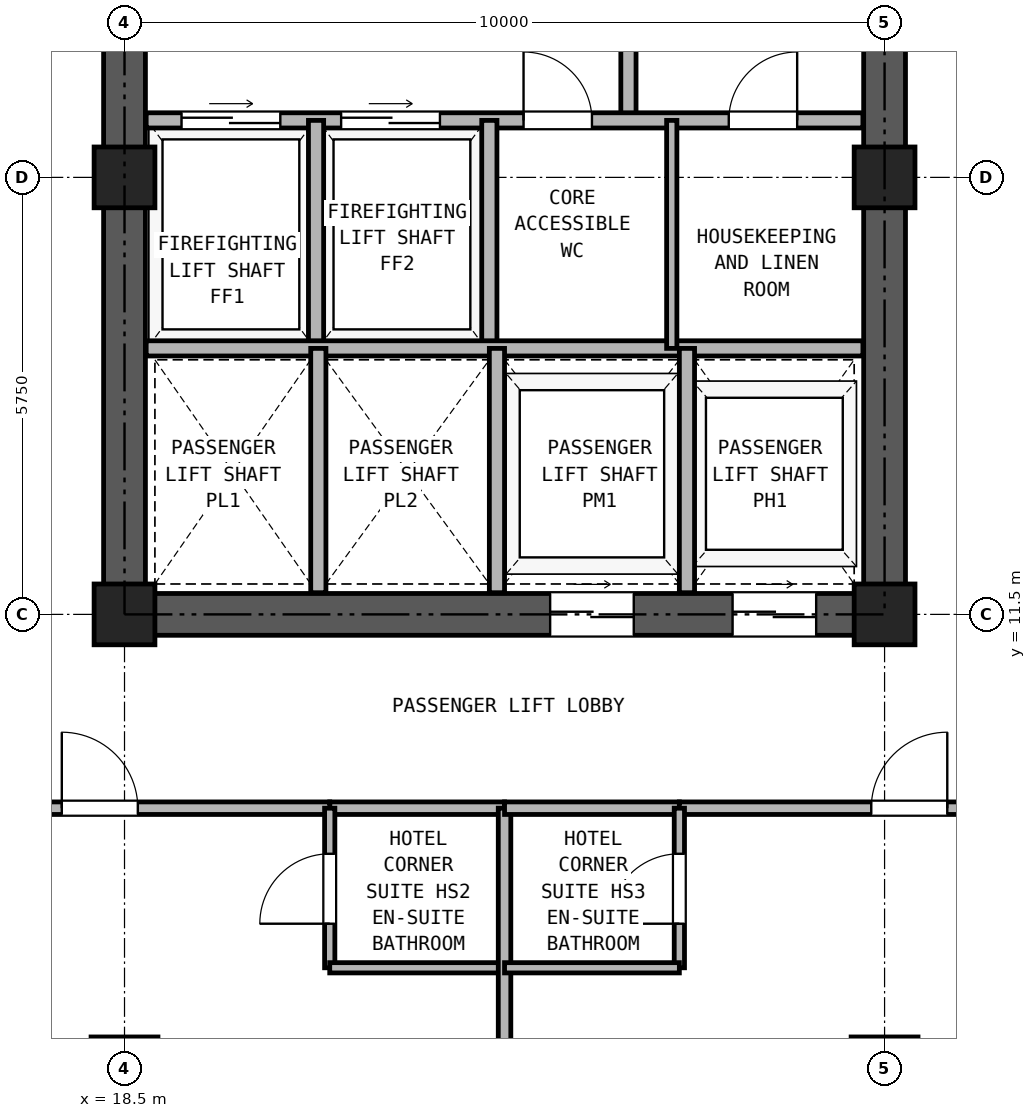
"""IFC4 building model, lengths in metres.
Left out: names, types, materials, properties, quantities, classifications, styles, units other than length and angle.
Written with IfcOpenShell. Run it as: python <this file> out.ifc"""

import sys

from ifc_helpers import new_model, si_unit, direction, frame, frame_2d, origin, origin_2d, place, context, subcontext, project, spatial, rectangle, hollow_rectangle, extrude, source, transform, mapped, element, fill, save


model = new_model("IFC4")
c1 = context("Model", 3, precision=1e-05, world=origin(), true_north=direction((0.0, 1.0)))
c2 = subcontext(c1, "Body", "Model", "MODEL_VIEW")
j1 = project(units=[si_unit("LENGTHUNIT", "METRE"), si_unit("PLANEANGLEUNIT", "RADIAN")], contexts=[c1])
p1 = place(None, origin())
s1 = spatial("IfcSite", under=j1, at=p1, CompositionType="ELEMENT")
p2 = place(p1, origin())
s2 = spatial("IfcBuilding", under=s1, at=p2, CompositionType="ELEMENT")
p3 = place(p2, frame((0.0, 0.0, 92.7)))
s3 = spatial("IfcBuildingStorey", under=s2, at=p3, CompositionType="ELEMENT", Elevation=92.7)
m1 = source(origin(), c2, "Body", "SweptSolid", [
    extrude(hollow_rectangle(XDim=0.88, YDim=0.88, WallThickness=0.05, at=origin_2d()), origin(), (0.0, 0.0, 1.0), 2.95),
])
p4 = place(p3, frame((18.5, 5.5, 0.0), z_axis=(0.0, 0.0, 1.0), x_axis=(1.0, 0.0, 0.0)))
e1 = element("IfcColumn", 1, at=p4, inside=s3, PredefinedType="COLUMN", context=c2, shape_type="MappedRepresentation", body=[
    mapped(m1, transform((0.0, 0.0, 0.0), x_axis=(1.0, 0.0, 0.0), y_axis=(0.0, 1.0, 0.0), z_axis=(0.0, 0.0, 1.0), scale=1.0)),
])
m2 = source(origin(), c2, "Body", "SweptSolid", [
    extrude(hollow_rectangle(XDim=0.8, YDim=0.8, WallThickness=0.045, at=origin_2d()), origin(), (0.0, 0.0, 1.0), 2.95),
])
for number, where, z_axis, x_axis in (
    (2, (18.5, 11.5, 0.0), (0.0, 0.0, 1.0), (1.0, 0.0, 0.0)),
    (3, (18.5, 17.25, 0.0), (0.0, 0.0, 1.0), (1.0, 0.0, 0.0)),
):
    element("IfcColumn", number, at=place(p3, frame(where, z_axis=z_axis, x_axis=x_axis)), inside=s3, PredefinedType="COLUMN", context=c2, shape_type="MappedRepresentation", body=[
        mapped(m2, transform((0.0, 0.0, 0.0), x_axis=(1.0, 0.0, 0.0), y_axis=(0.0, 1.0, 0.0), z_axis=(0.0, 0.0, 1.0), scale=1.0)),
    ])
p5 = place(p3, frame((28.5, 5.5, 0.0), z_axis=(0.0, 0.0, 1.0), x_axis=(1.0, 0.0, 0.0)))
e4 = element("IfcColumn", 4, at=p5, inside=s3, PredefinedType="COLUMN", context=c2, shape_type="MappedRepresentation", body=[
    mapped(m1, transform((0.0, 0.0, 0.0), x_axis=(1.0, 0.0, 0.0), y_axis=(0.0, 1.0, 0.0), z_axis=(0.0, 0.0, 1.0), scale=1.0)),
])
for number, where, z_axis, x_axis in (
    (5, (28.5, 11.5, 0.0), (0.0, 0.0, 1.0), (1.0, 0.0, 0.0)),
    (6, (28.5, 17.25, 0.0), (0.0, 0.0, 1.0), (1.0, 0.0, 0.0)),
):
    element("IfcColumn", number, at=place(p3, frame(where, z_axis=z_axis, x_axis=x_axis)), inside=s3, PredefinedType="COLUMN", context=c2, shape_type="MappedRepresentation", body=[
        mapped(m2, transform((0.0, 0.0, 0.0), x_axis=(1.0, 0.0, 0.0), y_axis=(0.0, 1.0, 0.0), z_axis=(0.0, 0.0, 1.0), scale=1.0)),
    ])
p6 = place(p3, frame((18.225, 11.5, 0.0), z_axis=(0.0, 0.0, 1.0), x_axis=(1.0, 0.0, 0.0)))
e7 = element("IfcWall", 7, at=p6, inside=s3, PredefinedType="SHEAR", context=c2, shape_type="SweptSolid", body=[
    extrude(rectangle(XDim=10.55, YDim=0.55, at=frame_2d((5.275, 0.0))), origin(), (0.0, 0.0, 1.0), 2.95),
])
p7 = place(p6, frame((5.875, 0.0, 0.0)))
e8 = element("IfcOpeningElement", 8, at=p7, cuts=e7, PredefinedType="OPENING", context=c2, shape_type="SweptSolid", body=[
    extrude(rectangle(XDim=1.1, YDim=2.25, at=frame_2d((0.55, 1.125))), frame((0.0, 0.285, 0.0), z_axis=(0.0, -1.0, 0.0), x_axis=(1.0, 0.0, 0.0)), (0.0, 0.0, 1.0), 0.57),
])
p8 = place(p6, frame((8.275, 0.0, 0.0)))
e9 = element("IfcOpeningElement", 9, at=p8, cuts=e7, PredefinedType="OPENING", context=c2, shape_type="SweptSolid", body=[
    extrude(rectangle(XDim=1.1, YDim=2.25, at=frame_2d((0.55, 1.125))), frame((0.0, 0.285, 0.0), z_axis=(0.0, -1.0, 0.0), x_axis=(1.0, 0.0, 0.0)), (0.0, 0.0, 1.0), 0.57),
])
p9 = place(p3, frame((18.5, 11.775, 0.0), z_axis=(0.0, 0.0, 1.0), x_axis=(0.0, 1.0, 0.0)))
e10 = element("IfcWall", 10, at=p9, inside=s3, PredefinedType="SHEAR", context=c2, shape_type="SweptSolid", body=[
    extrude(rectangle(XDim=16.7, YDim=0.55, at=frame_2d((8.35, 0.0))), origin(), (0.0, 0.0, 1.0), 2.95),
])
p10 = place(p9, frame((7.375, 0.0, 0.0)))
e11 = element("IfcOpeningElement", 11, at=p10, cuts=e10, PredefinedType="OPENING", context=c2, shape_type="SweptSolid", body=[
    extrude(rectangle(XDim=1.15, YDim=2.2, at=frame_2d((0.575, 1.1))), frame((0.0, 0.285, 0.0), z_axis=(0.0, -1.0, 0.0), x_axis=(1.0, 0.0, 0.0)), (0.0, 0.0, 1.0), 0.57),
])
p11 = place(p3, frame((28.5, 11.775, 0.0), z_axis=(0.0, 0.0, 1.0), x_axis=(0.0, 1.0, 0.0)))
e12 = element("IfcWall", 12, at=p11, inside=s3, PredefinedType="SHEAR", context=c2, shape_type="SweptSolid", body=[
    extrude(rectangle(XDim=16.7, YDim=0.55, at=frame_2d((8.35, 0.0))), origin(), (0.0, 0.0, 1.0), 2.95),
])
p12 = place(p11, frame((7.375, 0.0, 0.0)))
e13 = element("IfcOpeningElement", 13, at=p12, cuts=e12, PredefinedType="OPENING", context=c2, shape_type="SweptSolid", body=[
    extrude(rectangle(XDim=1.15, YDim=2.2, at=frame_2d((0.575, 1.1))), frame((0.0, 0.285, 0.0), z_axis=(0.0, -1.0, 0.0), x_axis=(1.0, 0.0, 0.0)), (0.0, 0.0, 1.0), 0.57),
])
p13 = place(p3, frame((25.13, 18.0, 0.0), z_axis=(0.0, 0.0, 1.0), x_axis=(0.0, 1.0, 0.0)))
e14 = element("IfcWall", 14, at=p13, inside=s3, PredefinedType="PARTITIONING", context=c2, shape_type="SweptSolid", body=[
    extrude(rectangle(XDim=3.39, YDim=0.2, at=frame_2d((1.695, 0.0))), origin(), (0.0, 0.0, 1.0), 2.95),
])
p14 = place(p13, frame((1.1, 0.0, 0.0)))
e15 = element("IfcOpeningElement", 15, at=p14, cuts=e14, PredefinedType="OPENING", context=c2, shape_type="SweptSolid", body=[
    extrude(rectangle(XDim=1.15, YDim=2.2, at=frame_2d((0.575, 1.1))), frame((0.0, 0.11, 0.0), z_axis=(0.0, -1.0, 0.0), x_axis=(1.0, 0.0, 0.0)), (0.0, 0.0, 1.0), 0.22),
])
p15 = place(p3, frame((18.785, 18.0, 0.0), z_axis=(0.0, 0.0, 1.0), x_axis=(1.0, 0.0, 0.0)))
e16 = element("IfcWall", 16, at=p15, inside=s3, PredefinedType="PARTITIONING", context=c2, shape_type="SweptSolid", body=[
    extrude(rectangle(XDim=9.43, YDim=0.2, at=frame_2d((4.715, 0.0))), origin(), (0.0, 0.0, 1.0), 2.95),
])
p16 = place(p15, frame((0.465, 0.0, 0.0)))
e17 = element("IfcOpeningElement", 17, at=p16, cuts=e16, PredefinedType="OPENING", context=c2, shape_type="SweptSolid", body=[
    extrude(rectangle(XDim=1.3, YDim=2.3, at=frame_2d((0.65, 1.15))), frame((0.0, 0.11, 0.0), z_axis=(0.0, -1.0, 0.0), x_axis=(1.0, 0.0, 0.0)), (0.0, 0.0, 1.0), 0.22),
])
p17 = place(p15, frame((2.565, 0.0, 0.0)))
e18 = element("IfcOpeningElement", 18, at=p17, cuts=e16, PredefinedType="OPENING", context=c2, shape_type="SweptSolid", body=[
    extrude(rectangle(XDim=1.3, YDim=2.3, at=frame_2d((0.65, 1.15))), frame((0.0, 0.11, 0.0), z_axis=(0.0, -1.0, 0.0), x_axis=(1.0, 0.0, 0.0)), (0.0, 0.0, 1.0), 0.22),
])
p18 = place(p15, frame((4.965, 0.0, 0.0)))
e19 = element("IfcOpeningElement", 19, at=p18, cuts=e16, PredefinedType="OPENING", context=c2, shape_type="SweptSolid", body=[
    extrude(rectangle(XDim=0.9, YDim=2.05, at=frame_2d((0.45, 1.025))), frame((0.0, 0.11, 0.0), z_axis=(0.0, -1.0, 0.0), x_axis=(1.0, 0.0, 0.0)), (0.0, 0.0, 1.0), 0.22),
])
p19 = place(p15, frame((7.665, 0.0, 0.0)))
e20 = element("IfcOpeningElement", 20, at=p19, cuts=e16, PredefinedType="OPENING", context=c2, shape_type="SweptSolid", body=[
    extrude(rectangle(XDim=0.9, YDim=2.05, at=frame_2d((0.45, 1.025))), frame((0.0, 0.11, 0.0), z_axis=(0.0, -1.0, 0.0), x_axis=(1.0, 0.0, 0.0)), (0.0, 0.0, 1.0), 0.22),
])
for number, where, z_axis, x_axis in (
    (21, (21.02, 15.0, 0.0), (0.0, 0.0, 1.0), (0.0, 1.0, 0.0)),
    (22, (23.3, 15.0, 0.0), (0.0, 0.0, 1.0), (0.0, 1.0, 0.0)),
):
    element("IfcWall", number, at=place(p3, frame(where, z_axis=z_axis, x_axis=x_axis)), inside=s3, PredefinedType="PARTITIONING", context=c2, shape_type="SweptSolid", body=[
        extrude(rectangle(XDim=3.0, YDim=0.2, at=frame_2d((1.5, 0.0))), origin(), (0.0, 0.0, 1.0), 2.95),
    ])
p20 = place(p3, frame((18.785, 15.0, 0.0), z_axis=(0.0, 0.0, 1.0), x_axis=(1.0, 0.0, 0.0)))
e23 = element("IfcWall", 23, at=p20, inside=s3, PredefinedType="PARTITIONING", context=c2, shape_type="SweptSolid", body=[
    extrude(rectangle(XDim=9.43, YDim=0.2, at=frame_2d((4.715, 0.0))), origin(), (0.0, 0.0, 1.0), 2.95),
])
p21 = place(p3, frame((25.7, 15.0, 0.0), z_axis=(0.0, 0.0, 1.0), x_axis=(0.0, 1.0, 0.0)))
e24 = element("IfcWall", 24, at=p21, inside=s3, PredefinedType="PARTITIONING", context=c2, shape_type="SweptSolid", body=[
    extrude(rectangle(XDim=3.0, YDim=0.135, at=frame_2d((1.5, 0.0))), origin(), (0.0, 0.0, 1.0), 2.95),
])
for number, where, z_axis, x_axis in (
    (25, (21.05, 11.785, 0.0), (0.0, 0.0, 1.0), (0.0, 1.0, 0.0)),
    (26, (23.4, 11.785, 0.0), (0.0, 0.0, 1.0), (0.0, 1.0, 0.0)),
    (27, (25.9, 11.785, 0.0), (0.0, 0.0, 1.0), (0.0, 1.0, 0.0)),
):
    element("IfcWall", number, at=place(p3, frame(where, z_axis=z_axis, x_axis=x_axis)), inside=s3, PredefinedType="PARTITIONING", context=c2, shape_type="SweptSolid", body=[
        extrude(rectangle(XDim=3.215, YDim=0.2, at=frame_2d((1.607, 0.0))), origin(), (0.0, 0.0, 1.0), 2.95),
    ])
p22 = place(p3, frame((21.2, 8.95, 0.0), z_axis=(0.0, 0.0, 1.0), x_axis=(1.0, 0.0, 0.0)))
e28 = element("IfcWall", 28, at=p22, inside=s3, PredefinedType="PARTITIONING", context=c2, shape_type="SweptSolid", body=[
    extrude(rectangle(XDim=2.3, YDim=0.165, at=frame_2d((1.15, 0.0))), origin(), (0.0, 0.0, 1.0), 2.95),
])
p23 = place(p3, frame((15.15, 8.95, 0.0), z_axis=(0.0, 0.0, 1.0), x_axis=(1.0, 0.0, 0.0)))
e29 = element("IfcWall", 29, at=p23, inside=s3, PredefinedType="PARTITIONING", context=c2, shape_type="SweptSolid", body=[
    extrude(rectangle(XDim=6.05, YDim=0.165, at=frame_2d((3.025, 0.0))), origin(), (0.0, 0.0, 1.0), 2.95),
])
p24 = place(p23, frame((2.525, 0.0, 0.0)))
e30 = element("IfcOpeningElement", 30, at=p24, cuts=e29, PredefinedType="OPENING", context=c2, shape_type="SweptSolid", body=[
    extrude(rectangle(XDim=1.0, YDim=2.15, at=frame_2d((0.5, 1.075))), frame((0.0, 0.093, 0.0), z_axis=(0.0, -1.0, 0.0), x_axis=(1.0, 0.0, 0.0)), (0.0, 0.0, 1.0), 0.185),
])
p25 = place(p3, frame((21.2, 6.85, 0.0), z_axis=(0.0, 0.0, 1.0), x_axis=(0.0, 1.0, 0.0)))
e31 = element("IfcWall", 31, at=p25, inside=s3, PredefinedType="PARTITIONING", context=c2, shape_type="SweptSolid", body=[
    extrude(rectangle(XDim=2.1, YDim=0.135, at=frame_2d((1.05, 0.0))), origin(), (0.0, 0.0, 1.0), 2.95),
])
p26 = place(p25, frame((0.58, 0.0, 0.0)))
e32 = element("IfcOpeningElement", 32, at=p26, cuts=e31, PredefinedType="OPENING", context=c2, shape_type="SweptSolid", body=[
    extrude(rectangle(XDim=0.92, YDim=2.1, at=frame_2d((0.46, 1.05))), frame((0.0, 0.077, 0.0), z_axis=(0.0, -1.0, 0.0), x_axis=(1.0, 0.0, 0.0)), (0.0, 0.0, 1.0), 0.155),
])
p27 = place(p3, frame((21.2, 6.85, 0.0), z_axis=(0.0, 0.0, 1.0), x_axis=(1.0, 0.0, 0.0)))
e33 = element("IfcWall", 33, at=p27, inside=s3, PredefinedType="PARTITIONING", context=c2, shape_type="SweptSolid", body=[
    extrude(rectangle(XDim=2.3, YDim=0.135, at=frame_2d((1.15, 0.0))), origin(), (0.0, 0.0, 1.0), 2.95),
])
p28 = place(p3, frame((23.5, 0.16, 0.0), z_axis=(0.0, 0.0, 1.0), x_axis=(0.0, 1.0, 0.0)))
e34 = element("IfcWall", 34, at=p28, inside=s3, PredefinedType="PARTITIONING", context=c2, shape_type="SweptSolid", body=[
    extrude(rectangle(XDim=8.79, YDim=0.165, at=frame_2d((4.395, 0.0))), origin(), (0.0, 0.0, 1.0), 2.95),
])
p29 = place(p3, frame((23.5, 8.95, 0.0), z_axis=(0.0, 0.0, 1.0), x_axis=(1.0, 0.0, 0.0)))
e35 = element("IfcWall", 35, at=p29, inside=s3, PredefinedType="PARTITIONING", context=c2, shape_type="SweptSolid", body=[
    extrude(rectangle(XDim=2.3, YDim=0.165, at=frame_2d((1.15, 0.0))), origin(), (0.0, 0.0, 1.0), 2.95),
])
p30 = place(p3, frame((25.8, 8.95, 0.0), z_axis=(0.0, 0.0, 1.0), x_axis=(1.0, 0.0, 0.0)))
e36 = element("IfcWall", 36, at=p30, inside=s3, PredefinedType="PARTITIONING", context=c2, shape_type="SweptSolid", body=[
    extrude(rectangle(XDim=6.05, YDim=0.165, at=frame_2d((3.025, 0.0))), origin(), (0.0, 0.0, 1.0), 2.95),
])
p31 = place(p30, frame((2.525, 0.0, 0.0)))
e37 = element("IfcOpeningElement", 37, at=p31, cuts=e36, PredefinedType="OPENING", context=c2, shape_type="SweptSolid", body=[
    extrude(rectangle(XDim=1.0, YDim=2.15, at=frame_2d((0.5, 1.075))), frame((0.0, 0.093, 0.0), z_axis=(0.0, -1.0, 0.0), x_axis=(1.0, 0.0, 0.0)), (0.0, 0.0, 1.0), 0.185),
])
p32 = place(p3, frame((25.8, 6.85, 0.0), z_axis=(0.0, 0.0, 1.0), x_axis=(0.0, 1.0, 0.0)))
e38 = element("IfcWall", 38, at=p32, inside=s3, PredefinedType="PARTITIONING", context=c2, shape_type="SweptSolid", body=[
    extrude(rectangle(XDim=2.1, YDim=0.135, at=frame_2d((1.05, 0.0))), origin(), (0.0, 0.0, 1.0), 2.95),
])
p33 = place(p32, frame((0.58, 0.0, 0.0)))
e39 = element("IfcOpeningElement", 39, at=p33, cuts=e38, PredefinedType="OPENING", context=c2, shape_type="SweptSolid", body=[
    extrude(rectangle(XDim=0.92, YDim=2.1, at=frame_2d((0.46, 1.05))), frame((0.0, 0.077, 0.0), z_axis=(0.0, -1.0, 0.0), x_axis=(1.0, 0.0, 0.0)), (0.0, 0.0, 1.0), 0.155),
])
p34 = place(p3, frame((23.5, 6.85, 0.0), z_axis=(0.0, 0.0, 1.0), x_axis=(1.0, 0.0, 0.0)))
e40 = element("IfcWall", 40, at=p34, inside=s3, PredefinedType="PARTITIONING", context=c2, shape_type="SweptSolid", body=[
    extrude(rectangle(XDim=2.3, YDim=0.135, at=frame_2d((1.15, 0.0))), origin(), (0.0, 0.0, 1.0), 2.95),
])
p35 = place(p16, origin())
e41 = element("IfcDoor", 41, at=p35, inside=s3, OperationType="DOUBLE_DOOR_SLIDING", PredefinedType="DOOR", context=c2, shape_type="SweptSolid", body=[
    extrude(rectangle(XDim=1.3, YDim=2.3, at=frame_2d((0.65, 1.15))), frame((0.0, 0.025, 0.0), z_axis=(0.0, -1.0, 0.0), x_axis=(1.0, 0.0, 0.0)), (0.0, 0.0, 1.0), 0.05),
])
fill(e17, e41)
p36 = place(p17, origin())
e42 = element("IfcDoor", 42, at=p36, inside=s3, OperationType="DOUBLE_DOOR_SLIDING", PredefinedType="DOOR", context=c2, shape_type="SweptSolid", body=[
    extrude(rectangle(XDim=1.3, YDim=2.3, at=frame_2d((0.65, 1.15))), frame((0.0, 0.025, 0.0), z_axis=(0.0, -1.0, 0.0), x_axis=(1.0, 0.0, 0.0)), (0.0, 0.0, 1.0), 0.05),
])
fill(e18, e42)
p37 = place(p18, frame((0.9, 0.0, 0.0), z_axis=(0.0, 0.0, 1.0), x_axis=(-1.0, 0.0, 0.0)))
e43 = element("IfcDoor", 43, at=p37, inside=s3, OperationType="SINGLE_SWING_LEFT", PredefinedType="DOOR", context=c2, shape_type="SweptSolid", body=[
    extrude(rectangle(XDim=0.9, YDim=2.05, at=frame_2d((0.45, 1.025))), frame((0.0, 0.025, 0.0), z_axis=(0.0, -1.0, 0.0), x_axis=(1.0, 0.0, 0.0)), (0.0, 0.0, 1.0), 0.05),
])
fill(e19, e43)
p38 = place(p19, frame((0.9, 0.0, 0.0), z_axis=(0.0, 0.0, 1.0), x_axis=(-1.0, 0.0, 0.0)))
e44 = element("IfcDoor", 44, at=p38, inside=s3, OperationType="SINGLE_SWING_RIGHT", PredefinedType="DOOR", context=c2, shape_type="SweptSolid", body=[
    extrude(rectangle(XDim=0.9, YDim=2.05, at=frame_2d((0.45, 1.025))), frame((0.0, 0.025, 0.0), z_axis=(0.0, -1.0, 0.0), x_axis=(1.0, 0.0, 0.0)), (0.0, 0.0, 1.0), 0.05),
])
fill(e20, e44)
p39 = place(p7, frame((1.1, 0.0, 0.0), z_axis=(0.0, 0.0, 1.0), x_axis=(-1.0, 0.0, 0.0)))
e45 = element("IfcDoor", 45, at=p39, inside=s3, OperationType="DOUBLE_DOOR_SLIDING", PredefinedType="DOOR", context=c2, shape_type="SweptSolid", body=[
    extrude(rectangle(XDim=1.1, YDim=2.25, at=frame_2d((0.55, 1.125))), frame((0.0, 0.025, 0.0), z_axis=(0.0, -1.0, 0.0), x_axis=(1.0, 0.0, 0.0)), (0.0, 0.0, 1.0), 0.05),
])
fill(e8, e45)
p40 = place(p8, frame((1.1, 0.0, 0.0), z_axis=(0.0, 0.0, 1.0), x_axis=(-1.0, 0.0, 0.0)))
e46 = element("IfcDoor", 46, at=p40, inside=s3, OperationType="DOUBLE_DOOR_SLIDING", PredefinedType="DOOR", context=c2, shape_type="SweptSolid", body=[
    extrude(rectangle(XDim=1.1, YDim=2.25, at=frame_2d((0.55, 1.125))), frame((0.0, 0.025, 0.0), z_axis=(0.0, -1.0, 0.0), x_axis=(1.0, 0.0, 0.0)), (0.0, 0.0, 1.0), 0.05),
])
fill(e9, e46)
p41 = place(p26, origin())
e47 = element("IfcDoor", 47, at=p41, inside=s3, OperationType="SINGLE_SWING_LEFT", PredefinedType="DOOR", context=c2, shape_type="SweptSolid", body=[
    extrude(rectangle(XDim=0.92, YDim=2.1, at=frame_2d((0.46, 1.05))), frame((0.0, 0.025, 0.0), z_axis=(0.0, -1.0, 0.0), x_axis=(1.0, 0.0, 0.0)), (0.0, 0.0, 1.0), 0.05),
])
fill(e32, e47)
p42 = place(p24, frame((1.0, 0.0, 0.0), z_axis=(0.0, 0.0, 1.0), x_axis=(-1.0, 0.0, 0.0)))
e48 = element("IfcDoor", 48, at=p42, inside=s3, OperationType="SINGLE_SWING_LEFT", PredefinedType="DOOR", context=c2, shape_type="SweptSolid", body=[
    extrude(rectangle(XDim=1.0, YDim=2.15, at=frame_2d((0.5, 1.075))), frame((0.0, 0.025, 0.0), z_axis=(0.0, -1.0, 0.0), x_axis=(1.0, 0.0, 0.0)), (0.0, 0.0, 1.0), 0.05),
])
fill(e30, e48)
p43 = place(p33, frame((0.92, 0.0, 0.0), z_axis=(0.0, 0.0, 1.0), x_axis=(-1.0, 0.0, 0.0)))
e49 = element("IfcDoor", 49, at=p43, inside=s3, OperationType="SINGLE_SWING_LEFT", PredefinedType="DOOR", context=c2, shape_type="SweptSolid", body=[
    extrude(rectangle(XDim=0.92, YDim=2.1, at=frame_2d((0.46, 1.05))), frame((0.0, 0.025, 0.0), z_axis=(0.0, -1.0, 0.0), x_axis=(1.0, 0.0, 0.0)), (0.0, 0.0, 1.0), 0.05),
])
fill(e39, e49)
p44 = place(p31, frame((1.0, 0.0, 0.0), z_axis=(0.0, 0.0, 1.0), x_axis=(-1.0, 0.0, 0.0)))
e50 = element("IfcDoor", 50, at=p44, inside=s3, OperationType="SINGLE_SWING_RIGHT", PredefinedType="DOOR", context=c2, shape_type="SweptSolid", body=[
    extrude(rectangle(XDim=1.0, YDim=2.15, at=frame_2d((0.5, 1.075))), frame((0.0, 0.025, 0.0), z_axis=(0.0, -1.0, 0.0), x_axis=(1.0, 0.0, 0.0)), (0.0, 0.0, 1.0), 0.05),
])
fill(e37, e50)
save(model, sys.argv[1])
